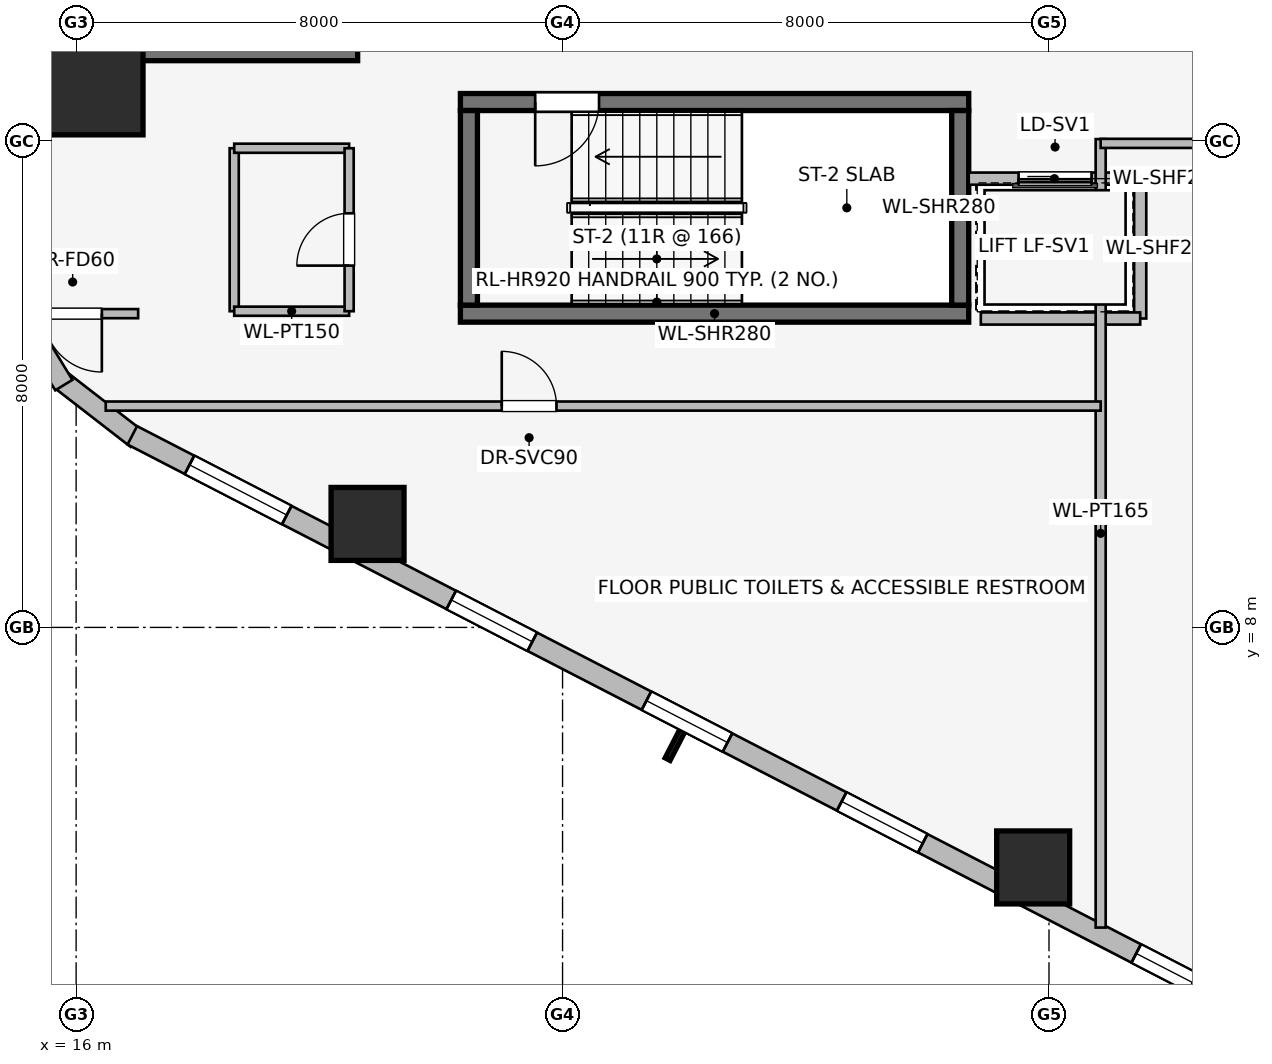
"""IFC4 building model, lengths in metres.
Left out: names, types, materials, properties, quantities, classifications, styles, units other than length and angle.
Written with IfcOpenShell. Run it as: python <this file> out.ifc"""

import sys

from ifc_helpers import new_model, si_unit, direction, frame, frame_2d, origin, origin_2d, place, context, subcontext, project, spatial, rectangle, extrude, element, fill, save


model = new_model("IFC4")
c1 = context("Model", 3, precision=1e-05, world=origin(), true_north=direction((0.0, 1.0)))
c2 = subcontext(c1, "Body", "Model", "MODEL_VIEW")
j1 = project(units=[si_unit("LENGTHUNIT", "METRE"), si_unit("PLANEANGLEUNIT", "RADIAN")], contexts=[c1])
p1 = place(None, origin())
s1 = spatial("IfcSite", under=j1, at=p1, CompositionType="ELEMENT")
p2 = place(p1, origin())
s2 = spatial("IfcBuilding", under=s1, at=p2, CompositionType="ELEMENT")
p3 = place(p2, frame((0.0, 0.0, 27.0)))
s3 = spatial("IfcBuildingStorey", under=s2, at=p3, CompositionType="ELEMENT", Elevation=27.0)
p4 = place(p3, frame((16.87, 17.46, 0.0), z_axis=(0.0, 0.0, 1.0), x_axis=(1.0, 0.0, 0.0)))
e1 = element("IfcWall", 1, at=p4, inside=s3, PredefinedType="SHEAR", context=c2, shape_type="SweptSolid", body=[
    extrude(rectangle(XDim=3.76, YDim=0.28, at=frame_2d((1.88, 0.0))), origin(), (0.0, 0.0, 1.0), 3.65),
])
p5 = place(p3, frame((22.32, 13.16, 0.0), z_axis=(0.0, 0.0, 1.0), x_axis=(1.0, 0.0, 0.0)))
e2 = element("IfcWall", 2, at=p5, inside=s3, PredefinedType="SHEAR", context=c2, shape_type="SweptSolid", body=[
    extrude(rectangle(XDim=8.36, YDim=0.28, at=frame_2d((4.18, 0.0))), origin(), (0.0, 0.0, 1.0), 3.65),
])
p6 = place(p3, frame((30.68, 16.64, 0.0), z_axis=(0.0, 0.0, 1.0), x_axis=(-1.0, 0.0, 0.0)))
e3 = element("IfcWall", 3, at=p6, inside=s3, PredefinedType="SHEAR", context=c2, shape_type="SweptSolid", body=[
    extrude(rectangle(XDim=8.36, YDim=0.28, at=frame_2d((4.18, 0.0))), origin(), (0.0, 0.0, 1.0), 3.65),
])
p7 = place(p6, frame((6.08, 0.0, 0.0)))
e4 = element("IfcOpeningElement", 4, at=p7, cuts=e3, PredefinedType="OPENING", context=c2, shape_type="SweptSolid", body=[
    extrude(rectangle(XDim=1.05, YDim=2.0, at=frame_2d((0.525, 1.0))), frame((0.0, 0.15, 0.0), z_axis=(0.0, -1.0, 0.0), x_axis=(1.0, 0.0, 0.0)), (0.0, 0.0, 1.0), 0.3),
])
for number, where, z_axis, x_axis in (
    (5, (22.46, 16.5, 0.0), (0.0, 0.0, 1.0), (0.0, -1.0, 0.0)),
    (6, (30.54, 13.3, 0.0), (0.0, 0.0, 1.0), (0.0, 1.0, 0.0)),
):
    element("IfcWall", number, at=place(p3, frame(where, z_axis=z_axis, x_axis=x_axis)), inside=s3, PredefinedType="SHEAR", context=c2, shape_type="SweptSolid", body=[
        extrude(rectangle(XDim=3.2, YDim=0.28, at=frame_2d((1.6, 0.0))), origin(), (0.0, 0.0, 1.0), 3.65),
    ])
p8 = place(p3, frame((16.3, 16.9, 0.0), z_axis=(0.0, 0.0, 1.0), x_axis=(1.0, 0.0, 0.0)))
e7 = element("IfcColumn", 7, at=p8, inside=s3, PredefinedType="COLUMN", context=c2, shape_type="SweptSolid", body=[
    extrude(rectangle(XDim=1.6, YDim=1.6, at=origin_2d()), origin(), (0.0, 0.0, 1.0), 3.65),
])
for number, where, z_axis, x_axis in (
    (8, (20.793, 9.702, -0.42), (0.0, 0.0, 1.0), (1.0, 0.0, 0.0)),
    (9, (31.74, 4.053, -0.42), (0.0, 0.0, 1.0), (1.0, 0.0, 0.0)),
):
    element("IfcColumn", number, at=place(p3, frame(where, z_axis=z_axis, x_axis=x_axis)), inside=s3, PredefinedType="COLUMN", context=c2, shape_type="SweptSolid", body=[
        extrude(rectangle(XDim=1.2, YDim=1.2, at=origin_2d()), origin(), (0.0, 0.0, 1.0), 4.07),
    ])
p9 = place(p3, frame((16.998, 11.099, 0.0), z_axis=(0.0, 0.0, 1.0), x_axis=(-0.790691856293, 0.61221433207, 0.0)))
e10 = element("IfcWall", 10, at=p9, inside=s3, PredefinedType="STANDARD", context=c2, shape_type="SweptSolid", body=[
    extrude(rectangle(XDim=1.676, YDim=0.33, at=frame_2d((0.838, 0.0))), origin(), (0.0, 0.0, 1.0), 3.39),
])
p10 = place(p3, frame((15.798, 11.985, 0.0), z_axis=(0.0, 0.0, 1.0), x_axis=(-0.520584129191, 0.853810379671, 0.0)))
e11 = element("IfcWall", 11, at=p10, inside=s3, PredefinedType="STANDARD", context=c2, shape_type="SweptSolid", body=[
    extrude(rectangle(XDim=1.677, YDim=0.33, at=frame_2d((0.838, 0.0))), origin(), (0.0, 0.0, 1.0), 3.39),
])
p11 = place(p3, frame((35.169, 1.743, 0.0), z_axis=(0.0, 0.0, 1.0), x_axis=(-0.888634413993, 0.458616264721, 0.0)))
e12 = element("IfcWall", 12, at=p11, inside=s3, PredefinedType="STANDARD", context=c2, shape_type="SweptSolid", body=[
    extrude(rectangle(XDim=20.531, YDim=0.34, at=frame_2d((10.266, 0.0))), origin(), (0.0, 0.0, 1.0), 2.684),
])
p12 = place(p11, frame((0.902, 0.0, 0.75)))
e13 = element("IfcOpeningElement", 13, at=p12, cuts=e12, PredefinedType="OPENING", context=c2, shape_type="SweptSolid", body=[
    extrude(rectangle(XDim=1.05, YDim=1.4, at=frame_2d((0.525, 0.7))), frame((0.0, 0.18, 0.0), z_axis=(0.0, -1.0, 0.0), x_axis=(1.0, 0.0, 0.0)), (0.0, 0.0, 1.0), 0.36),
])
p13 = place(p11, frame((5.903, 0.0, 0.75)))
e14 = element("IfcOpeningElement", 14, at=p13, cuts=e12, PredefinedType="OPENING", context=c2, shape_type="SweptSolid", body=[
    extrude(rectangle(XDim=1.5, YDim=1.5, at=frame_2d((0.75, 0.75))), frame((0.0, 0.18, 0.0), z_axis=(0.0, -1.0, 0.0), x_axis=(1.0, 0.0, 0.0)), (0.0, 0.0, 1.0), 0.36),
])
p14 = place(p11, frame((9.516, 0.0, 0.75)))
e15 = element("IfcOpeningElement", 15, at=p14, cuts=e12, PredefinedType="OPENING", context=c2, shape_type="SweptSolid", body=[
    extrude(rectangle(XDim=1.5, YDim=1.5, at=frame_2d((0.75, 0.75))), frame((0.0, 0.18, 0.0), z_axis=(0.0, -1.0, 0.0), x_axis=(1.0, 0.0, 0.0)), (0.0, 0.0, 1.0), 0.36),
])
p15 = place(p11, frame((13.129, 0.0, 0.75)))
e16 = element("IfcOpeningElement", 16, at=p15, cuts=e12, PredefinedType="OPENING", context=c2, shape_type="SweptSolid", body=[
    extrude(rectangle(XDim=1.5, YDim=1.5, at=frame_2d((0.75, 0.75))), frame((0.0, 0.18, 0.0), z_axis=(0.0, -1.0, 0.0), x_axis=(1.0, 0.0, 0.0)), (0.0, 0.0, 1.0), 0.36),
])
p16 = place(p11, frame((17.673, 0.0, 0.75)))
e17 = element("IfcOpeningElement", 17, at=p16, cuts=e12, PredefinedType="OPENING", context=c2, shape_type="SweptSolid", body=[
    extrude(rectangle(XDim=1.8, YDim=1.5, at=frame_2d((0.9, 0.75))), frame((0.0, 0.18, 0.0), z_axis=(0.0, -1.0, 0.0), x_axis=(1.0, 0.0, 0.0)), (0.0, 0.0, 1.0), 0.36),
])
p17 = place(p3, frame((33.5, 15.38, 0.0), z_axis=(0.0, 0.0, 1.0), x_axis=(-1.0, 0.0, 0.0)))
e18 = element("IfcWall", 18, at=p17, inside=s3, PredefinedType="PARTITIONING", context=c2, shape_type="SweptSolid", body=[
    extrude(rectangle(XDim=2.82, YDim=0.2, at=frame_2d((1.41, 0.0))), origin(), (0.0, 0.0, 1.0), 3.39),
])
p18 = place(p17, frame((0.8, 0.0, 0.0)))
e19 = element("IfcOpeningElement", 19, at=p18, cuts=e18, PredefinedType="OPENING", context=c2, shape_type="SweptSolid", body=[
    extrude(rectangle(XDim=1.2, YDim=2.2, at=frame_2d((0.6, 1.1))), frame((0.0, 0.11, 0.0), z_axis=(0.0, -1.0, 0.0), x_axis=(1.0, 0.0, 0.0)), (0.0, 0.0, 1.0), 0.22),
])
p19 = place(p3, frame((33.5, 13.08, 0.0), z_axis=(0.0, 0.0, 1.0), x_axis=(0.0, 1.0, 0.0)))
e20 = element("IfcWall", 20, at=p19, inside=s3, PredefinedType="PARTITIONING", context=c2, shape_type="SweptSolid", body=[
    extrude(rectangle(XDim=2.3, YDim=0.2, at=frame_2d((1.15, 0.0))), origin(), (0.0, 0.0, 1.0), 3.39),
])
p20 = place(p3, frame((30.879, 13.08, 0.0), z_axis=(0.0, 0.0, 1.0), x_axis=(1.0, 0.0, 0.0)))
e21 = element("IfcWall", 21, at=p20, inside=s3, PredefinedType="PARTITIONING", context=c2, shape_type="SweptSolid", body=[
    extrude(rectangle(XDim=2.621, YDim=0.2, at=frame_2d((1.311, 0.0))), origin(), (0.0, 0.0, 1.0), 3.39),
])
p21 = place(p3, frame((18.6, 15.88, 0.0), z_axis=(0.0, 0.0, 1.0), x_axis=(0.0, -1.0, 0.0)))
e22 = element("IfcWall", 22, at=p21, inside=s3, PredefinedType="PARTITIONING", context=c2, shape_type="SweptSolid", body=[
    extrude(rectangle(XDim=2.68, YDim=0.15, at=frame_2d((1.34, 0.0))), origin(), (0.0, 0.0, 1.0), 3.39),
])
for number, where, z_axis, x_axis in (
    (23, (18.6, 13.2, 0.0), (0.0, 0.0, 1.0), (1.0, 0.0, 0.0)),
    (24, (18.6, 15.88, 0.0), (0.0, 0.0, 1.0), (1.0, 0.0, 0.0)),
):
    element("IfcWall", number, at=place(p3, frame(where, z_axis=z_axis, x_axis=x_axis)), inside=s3, PredefinedType="PARTITIONING", context=c2, shape_type="SweptSolid", body=[
        extrude(rectangle(XDim=1.89, YDim=0.15, at=frame_2d((0.945, 0.0))), origin(), (0.0, 0.0, 1.0), 3.39),
    ])
p22 = place(p3, frame((20.49, 13.2, 0.0), z_axis=(0.0, 0.0, 1.0), x_axis=(0.0, 1.0, 0.0)))
e25 = element("IfcWall", 25, at=p22, inside=s3, PredefinedType="PARTITIONING", context=c2, shape_type="SweptSolid", body=[
    extrude(rectangle(XDim=2.68, YDim=0.15, at=frame_2d((1.34, 0.0))), origin(), (0.0, 0.0, 1.0), 3.39),
])
p23 = place(p22, frame((0.75, 0.0, 0.0)))
e26 = element("IfcOpeningElement", 26, at=p23, cuts=e25, PredefinedType="OPENING", context=c2, shape_type="SweptSolid", body=[
    extrude(rectangle(XDim=0.86, YDim=2.0, at=frame_2d((0.43, 1.0))), frame((0.0, 0.085, 0.0), z_axis=(0.0, -1.0, 0.0), x_axis=(1.0, 0.0, 0.0)), (0.0, 0.0, 1.0), 0.17),
])
p24 = place(p3, frame((32.85, 3.064, 0.0), z_axis=(0.0, 0.0, 1.0), x_axis=(0.0, 1.0, 0.0)))
e27 = element("IfcWall", 27, at=p24, inside=s3, PredefinedType="PARTITIONING", context=c2, shape_type="SweptSolid", body=[
    extrude(rectangle(XDim=12.966, YDim=0.165, at=frame_2d((6.483, 0.0))), origin(), (0.0, 0.0, 1.0), 3.39),
])
p25 = place(p3, frame((16.487, 11.64, 0.0), z_axis=(0.0, 0.0, 1.0), x_axis=(1.0, 0.0, 0.0)))
e28 = element("IfcWall", 28, at=p25, inside=s3, PredefinedType="PARTITIONING", context=c2, shape_type="SweptSolid", body=[
    extrude(rectangle(XDim=16.363, YDim=0.15, at=frame_2d((8.182, 0.0))), origin(), (0.0, 0.0, 1.0), 3.39),
])
p26 = place(p25, frame((6.513, 0.0, 0.0)))
e29 = element("IfcOpeningElement", 29, at=p26, cuts=e28, PredefinedType="OPENING", context=c2, shape_type="SweptSolid", body=[
    extrude(rectangle(XDim=0.9, YDim=2.0, at=frame_2d((0.45, 1.0))), frame((0.0, 0.085, 0.0), z_axis=(0.0, -1.0, 0.0), x_axis=(1.0, 0.0, 0.0)), (0.0, 0.0, 1.0), 0.17),
])
p27 = place(p3, frame((17.02, 13.16, 0.0), z_axis=(0.0, 0.0, 1.0), x_axis=(-1.0, 0.0, 0.0)))
e30 = element("IfcWall", 30, at=p27, inside=s3, PredefinedType="PARTITIONING", context=c2, shape_type="SweptSolid", body=[
    extrude(rectangle(XDim=2.12, YDim=0.15, at=frame_2d((1.06, 0.0))), origin(), (0.0, 0.0, 1.0), 3.39),
])
p28 = place(p27, frame((0.597, 0.0, 0.0)))
e31 = element("IfcOpeningElement", 31, at=p28, cuts=e30, PredefinedType="OPENING", context=c2, shape_type="SweptSolid", body=[
    extrude(rectangle(XDim=0.96, YDim=2.0, at=frame_2d((0.48, 1.0))), frame((0.0, 0.085, 0.0), z_axis=(0.0, -1.0, 0.0), x_axis=(1.0, 0.0, 0.0)), (0.0, 0.0, 1.0), 0.17),
])
p29 = place(p3, frame((32.85, 15.96, 0.0), z_axis=(0.0, 0.0, 1.0), x_axis=(1.0, 0.0, 0.0)))
e32 = element("IfcWall", 32, at=p29, inside=s3, PredefinedType="PARTITIONING", context=c2, shape_type="SweptSolid", body=[
    extrude(rectangle(XDim=27.403, YDim=0.15, at=frame_2d((13.701, 0.0))), origin(), (0.0, 0.0, 1.0), 3.39),
])
p30 = place(p29, frame((13.235, 0.0, 0.0)))
e33 = element("IfcOpeningElement", 33, at=p30, cuts=e32, PredefinedType="OPENING", context=c2, shape_type="SweptSolid", body=[
    extrude(rectangle(XDim=0.96, YDim=2.0, at=frame_2d((0.48, 1.0))), frame((0.0, 0.085, 0.0), z_axis=(0.0, -1.0, 0.0), x_axis=(1.0, 0.0, 0.0)), (0.0, 0.0, 1.0), 0.17),
])
p31 = place(p12, origin())
e34 = element("IfcWindow", 34, at=p31, inside=s3, PartitioningType="SINGLE_PANEL", PredefinedType="WINDOW", context=c2, shape_type="SweptSolid", body=[
    extrude(rectangle(XDim=1.05, YDim=1.4, at=frame_2d((0.525, 0.7))), frame((0.0, 0.03, 0.0), z_axis=(0.0, -1.0, 0.0), x_axis=(1.0, 0.0, 0.0)), (0.0, 0.0, 1.0), 0.06),
])
fill(e13, e34)
p32 = place(p13, origin())
e35 = element("IfcWindow", 35, at=p32, inside=s3, PartitioningType="SINGLE_PANEL", PredefinedType="WINDOW", context=c2, shape_type="SweptSolid", body=[
    extrude(rectangle(XDim=1.5, YDim=1.5, at=frame_2d((0.75, 0.75))), frame((0.0, 0.03, 0.0), z_axis=(0.0, -1.0, 0.0), x_axis=(1.0, 0.0, 0.0)), (0.0, 0.0, 1.0), 0.06),
])
fill(e14, e35)
p33 = place(p14, origin())
e36 = element("IfcWindow", 36, at=p33, inside=s3, PartitioningType="SINGLE_PANEL", PredefinedType="WINDOW", context=c2, shape_type="SweptSolid", body=[
    extrude(rectangle(XDim=1.5, YDim=1.5, at=frame_2d((0.75, 0.75))), frame((0.0, 0.03, 0.0), z_axis=(0.0, -1.0, 0.0), x_axis=(1.0, 0.0, 0.0)), (0.0, 0.0, 1.0), 0.06),
])
fill(e15, e36)
p34 = place(p15, origin())
e37 = element("IfcWindow", 37, at=p34, inside=s3, PartitioningType="SINGLE_PANEL", PredefinedType="WINDOW", context=c2, shape_type="SweptSolid", body=[
    extrude(rectangle(XDim=1.5, YDim=1.5, at=frame_2d((0.75, 0.75))), frame((0.0, 0.03, 0.0), z_axis=(0.0, -1.0, 0.0), x_axis=(1.0, 0.0, 0.0)), (0.0, 0.0, 1.0), 0.06),
])
fill(e16, e37)
p35 = place(p16, origin())
e38 = element("IfcWindow", 38, at=p35, inside=s3, PartitioningType="SINGLE_PANEL", PredefinedType="WINDOW", context=c2, shape_type="SweptSolid", body=[
    extrude(rectangle(XDim=1.8, YDim=1.5, at=frame_2d((0.9, 0.75))), frame((0.0, 0.03, 0.0), z_axis=(0.0, -1.0, 0.0), x_axis=(1.0, 0.0, 0.0)), (0.0, 0.0, 1.0), 0.06),
])
fill(e17, e38)
p36 = place(p7, origin())
e39 = element("IfcDoor", 39, at=p36, inside=s3, OperationType="SINGLE_SWING_RIGHT", PredefinedType="DOOR", context=c2, shape_type="SweptSolid", body=[
    extrude(rectangle(XDim=1.05, YDim=2.0, at=frame_2d((0.525, 1.0))), frame((0.0, 0.025, 0.0), z_axis=(0.0, -1.0, 0.0), x_axis=(1.0, 0.0, 0.0)), (0.0, 0.0, 1.0), 0.05),
])
fill(e4, e39)
p37 = place(p18, origin())
e40 = element("IfcDoor", 40, at=p37, inside=s3, OperationType="SLIDING_TO_RIGHT", PredefinedType="DOOR", context=c2, shape_type="SweptSolid", body=[
    extrude(rectangle(XDim=1.2, YDim=2.2, at=frame_2d((0.6, 1.1))), frame((0.0, 0.025, 0.0), z_axis=(0.0, -1.0, 0.0), x_axis=(1.0, 0.0, 0.0)), (0.0, 0.0, 1.0), 0.05),
])
fill(e19, e40)
p38 = place(p23, origin())
e41 = element("IfcDoor", 41, at=p38, inside=s3, OperationType="SINGLE_SWING_LEFT", PredefinedType="DOOR", context=c2, shape_type="SweptSolid", body=[
    extrude(rectangle(XDim=0.86, YDim=2.0, at=frame_2d((0.43, 1.0))), frame((0.0, 0.025, 0.0), z_axis=(0.0, -1.0, 0.0), x_axis=(1.0, 0.0, 0.0)), (0.0, 0.0, 1.0), 0.05),
])
fill(e26, e41)
p39 = place(p26, origin())
e42 = element("IfcDoor", 42, at=p39, inside=s3, OperationType="SINGLE_SWING_LEFT", PredefinedType="DOOR", context=c2, shape_type="SweptSolid", body=[
    extrude(rectangle(XDim=0.9, YDim=2.0, at=frame_2d((0.45, 1.0))), frame((0.0, 0.025, 0.0), z_axis=(0.0, -1.0, 0.0), x_axis=(1.0, 0.0, 0.0)), (0.0, 0.0, 1.0), 0.05),
])
fill(e29, e42)
p40 = place(p28, origin())
e43 = element("IfcDoor", 43, at=p40, inside=s3, OperationType="SINGLE_SWING_LEFT", PredefinedType="DOOR", context=c2, shape_type="SweptSolid", body=[
    extrude(rectangle(XDim=0.96, YDim=2.0, at=frame_2d((0.48, 1.0))), frame((0.0, 0.025, 0.0), z_axis=(0.0, -1.0, 0.0), x_axis=(1.0, 0.0, 0.0)), (0.0, 0.0, 1.0), 0.05),
])
fill(e31, e43)
save(model, sys.argv[1])
